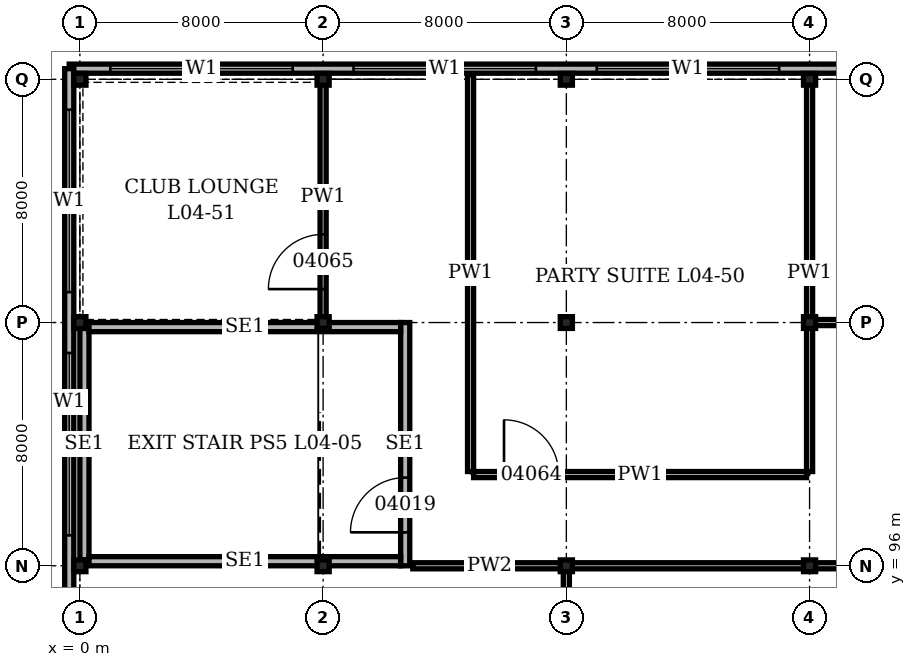
"""IFC4 building model, lengths in metres.
Left out: names, types, materials, properties, quantities, classifications, styles, units other than length and angle.
Written with IfcOpenShell. Run it as: python <this file> out.ifc"""

import sys

from ifc_helpers import new_model, si_unit, direction, frame, frame_2d, origin, origin_2d, place, context, subcontext, project, spatial, rectangle, i_section, extrude, element, fill, save


model = new_model("IFC4")
c1 = context("Model", 3, precision=1e-05, world=origin(), true_north=direction((0.0, 1.0)))
c2 = subcontext(c1, "Body", "Model", "MODEL_VIEW")
j1 = project(units=[si_unit("LENGTHUNIT", "METRE"), si_unit("PLANEANGLEUNIT", "RADIAN")], contexts=[c1])
p1 = place(None, origin())
s1 = spatial("IfcSite", under=j1, at=p1, CompositionType="ELEMENT")
p2 = place(p1, origin())
s2 = spatial("IfcBuilding", under=s1, at=p2, CompositionType="ELEMENT")
p3 = place(p2, frame((0.0, 0.0, 19.9)))
s3 = spatial("IfcBuildingStorey", under=s2, at=p3, CompositionType="ELEMENT", Elevation=19.9)
for number, where, z_axis, x_axis in (
    (1, (0.0, 96.0, 0.0), (0.0, 0.0, 1.0), (1.0, 0.0, 0.0)),
    (2, (0.0, 104.0, 0.0), (0.0, 0.0, 1.0), (1.0, 0.0, 0.0)),
    (3, (0.0, 112.0, 0.0), (0.0, 0.0, 1.0), (1.0, 0.0, 0.0)),
    (4, (8.0, 96.0, 0.0), (0.0, 0.0, 1.0), (1.0, 0.0, 0.0)),
    (5, (8.0, 104.0, 0.0), (0.0, 0.0, 1.0), (1.0, 0.0, 0.0)),
    (6, (8.0, 112.0, 0.0), (0.0, 0.0, 1.0), (1.0, 0.0, 0.0)),
    (7, (16.0, 96.0, 0.0), (0.0, 0.0, 1.0), (1.0, 0.0, 0.0)),
    (8, (16.0, 104.0, 0.0), (0.0, 0.0, 1.0), (1.0, 0.0, 0.0)),
    (9, (16.0, 112.0, 0.0), (0.0, 0.0, 1.0), (1.0, 0.0, 0.0)),
    (10, (24.0, 96.0, 0.0), (0.0, 0.0, 1.0), (1.0, 0.0, 0.0)),
    (11, (24.0, 104.0, 0.0), (0.0, 0.0, 1.0), (1.0, 0.0, 0.0)),
    (12, (24.0, 112.0, 0.0), (0.0, 0.0, 1.0), (1.0, 0.0, 0.0)),
):
    element("IfcColumn", number, at=place(p3, frame(where, z_axis=z_axis, x_axis=x_axis)), inside=s3, PredefinedType="COLUMN", context=c2, shape_type="SweptSolid", body=[
        extrude(i_section(OverallWidth=0.399, OverallDepth=0.386, WebThickness=0.021, FlangeThickness=0.033, at=origin_2d()), origin(), (0.0, 0.0, 1.0), 6.0),
    ])
p4 = place(p3, frame((112.35, 112.35, 0.0), z_axis=(0.0, 0.0, 1.0), x_axis=(-1.0, 0.0, 0.0)))
e13 = element("IfcWall", 13, at=p4, inside=s3, PredefinedType="SOLIDWALL", context=c2, shape_type="SweptSolid", body=[
    extrude(rectangle(XDim=112.7, YDim=0.3, at=frame_2d((56.35, 0.0))), origin(), (0.0, 0.0, 1.0), 6.0),
])
p5 = place(p4, frame((1.35, 0.0, 1.0)))
e14 = element("IfcOpeningElement", 14, at=p5, cuts=e13, PredefinedType="OPENING", context=c2, shape_type="SweptSolid", body=[
    extrude(rectangle(XDim=6.0, YDim=1.5, at=frame_2d((3.0, 0.75))), frame((0.0, 0.16, 0.0), z_axis=(0.0, -1.0, 0.0), x_axis=(1.0, 0.0, 0.0)), (0.0, 0.0, 1.0), 0.32),
])
p6 = place(p4, frame((9.35, 0.0, 1.0)))
e15 = element("IfcOpeningElement", 15, at=p6, cuts=e13, PredefinedType="OPENING", context=c2, shape_type="SweptSolid", body=[
    extrude(rectangle(XDim=6.0, YDim=1.5, at=frame_2d((3.0, 0.75))), frame((0.0, 0.16, 0.0), z_axis=(0.0, -1.0, 0.0), x_axis=(1.0, 0.0, 0.0)), (0.0, 0.0, 1.0), 0.32),
])
p7 = place(p4, frame((17.35, 0.0, 1.0)))
e16 = element("IfcOpeningElement", 16, at=p7, cuts=e13, PredefinedType="OPENING", context=c2, shape_type="SweptSolid", body=[
    extrude(rectangle(XDim=6.0, YDim=1.5, at=frame_2d((3.0, 0.75))), frame((0.0, 0.16, 0.0), z_axis=(0.0, -1.0, 0.0), x_axis=(1.0, 0.0, 0.0)), (0.0, 0.0, 1.0), 0.32),
])
p8 = place(p4, frame((25.35, 0.0, 1.0)))
e17 = element("IfcOpeningElement", 17, at=p8, cuts=e13, PredefinedType="OPENING", context=c2, shape_type="SweptSolid", body=[
    extrude(rectangle(XDim=6.0, YDim=1.5, at=frame_2d((3.0, 0.75))), frame((0.0, 0.16, 0.0), z_axis=(0.0, -1.0, 0.0), x_axis=(1.0, 0.0, 0.0)), (0.0, 0.0, 1.0), 0.32),
])
p9 = place(p4, frame((33.35, 0.0, 1.0)))
e18 = element("IfcOpeningElement", 18, at=p9, cuts=e13, PredefinedType="OPENING", context=c2, shape_type="SweptSolid", body=[
    extrude(rectangle(XDim=6.0, YDim=1.5, at=frame_2d((3.0, 0.75))), frame((0.0, 0.16, 0.0), z_axis=(0.0, -1.0, 0.0), x_axis=(1.0, 0.0, 0.0)), (0.0, 0.0, 1.0), 0.32),
])
p10 = place(p4, frame((41.35, 0.0, 1.0)))
e19 = element("IfcOpeningElement", 19, at=p10, cuts=e13, PredefinedType="OPENING", context=c2, shape_type="SweptSolid", body=[
    extrude(rectangle(XDim=6.0, YDim=1.5, at=frame_2d((3.0, 0.75))), frame((0.0, 0.16, 0.0), z_axis=(0.0, -1.0, 0.0), x_axis=(1.0, 0.0, 0.0)), (0.0, 0.0, 1.0), 0.32),
])
p11 = place(p4, frame((49.35, 0.0, 1.0)))
e20 = element("IfcOpeningElement", 20, at=p11, cuts=e13, PredefinedType="OPENING", context=c2, shape_type="SweptSolid", body=[
    extrude(rectangle(XDim=6.0, YDim=1.5, at=frame_2d((3.0, 0.75))), frame((0.0, 0.16, 0.0), z_axis=(0.0, -1.0, 0.0), x_axis=(1.0, 0.0, 0.0)), (0.0, 0.0, 1.0), 0.32),
])
p12 = place(p4, frame((57.35, 0.0, 1.0)))
e21 = element("IfcOpeningElement", 21, at=p12, cuts=e13, PredefinedType="OPENING", context=c2, shape_type="SweptSolid", body=[
    extrude(rectangle(XDim=6.0, YDim=1.5, at=frame_2d((3.0, 0.75))), frame((0.0, 0.16, 0.0), z_axis=(0.0, -1.0, 0.0), x_axis=(1.0, 0.0, 0.0)), (0.0, 0.0, 1.0), 0.32),
])
p13 = place(p4, frame((65.35, 0.0, 1.0)))
e22 = element("IfcOpeningElement", 22, at=p13, cuts=e13, PredefinedType="OPENING", context=c2, shape_type="SweptSolid", body=[
    extrude(rectangle(XDim=6.0, YDim=1.5, at=frame_2d((3.0, 0.75))), frame((0.0, 0.16, 0.0), z_axis=(0.0, -1.0, 0.0), x_axis=(1.0, 0.0, 0.0)), (0.0, 0.0, 1.0), 0.32),
])
p14 = place(p4, frame((73.35, 0.0, 1.0)))
e23 = element("IfcOpeningElement", 23, at=p14, cuts=e13, PredefinedType="OPENING", context=c2, shape_type="SweptSolid", body=[
    extrude(rectangle(XDim=6.0, YDim=1.5, at=frame_2d((3.0, 0.75))), frame((0.0, 0.16, 0.0), z_axis=(0.0, -1.0, 0.0), x_axis=(1.0, 0.0, 0.0)), (0.0, 0.0, 1.0), 0.32),
])
p15 = place(p4, frame((81.35, 0.0, 1.0)))
e24 = element("IfcOpeningElement", 24, at=p15, cuts=e13, PredefinedType="OPENING", context=c2, shape_type="SweptSolid", body=[
    extrude(rectangle(XDim=6.0, YDim=1.5, at=frame_2d((3.0, 0.75))), frame((0.0, 0.16, 0.0), z_axis=(0.0, -1.0, 0.0), x_axis=(1.0, 0.0, 0.0)), (0.0, 0.0, 1.0), 0.32),
])
p16 = place(p4, frame((89.35, 0.0, 1.0)))
e25 = element("IfcOpeningElement", 25, at=p16, cuts=e13, PredefinedType="OPENING", context=c2, shape_type="SweptSolid", body=[
    extrude(rectangle(XDim=6.0, YDim=1.5, at=frame_2d((3.0, 0.75))), frame((0.0, 0.16, 0.0), z_axis=(0.0, -1.0, 0.0), x_axis=(1.0, 0.0, 0.0)), (0.0, 0.0, 1.0), 0.32),
])
p17 = place(p4, frame((97.35, 0.0, 1.0)))
e26 = element("IfcOpeningElement", 26, at=p17, cuts=e13, PredefinedType="OPENING", context=c2, shape_type="SweptSolid", body=[
    extrude(rectangle(XDim=6.0, YDim=1.5, at=frame_2d((3.0, 0.75))), frame((0.0, 0.16, 0.0), z_axis=(0.0, -1.0, 0.0), x_axis=(1.0, 0.0, 0.0)), (0.0, 0.0, 1.0), 0.32),
])
p18 = place(p4, frame((105.35, 0.0, 1.0)))
e27 = element("IfcOpeningElement", 27, at=p18, cuts=e13, PredefinedType="OPENING", context=c2, shape_type="SweptSolid", body=[
    extrude(rectangle(XDim=6.0, YDim=1.5, at=frame_2d((3.0, 0.75))), frame((0.0, 0.16, 0.0), z_axis=(0.0, -1.0, 0.0), x_axis=(1.0, 0.0, 0.0)), (0.0, 0.0, 1.0), 0.32),
])
p19 = place(p3, frame((-0.35, 112.35, 0.0), z_axis=(0.0, 0.0, 1.0), x_axis=(0.0, -1.0, 0.0)))
e28 = element("IfcWall", 28, at=p19, inside=s3, PredefinedType="SOLIDWALL", context=c2, shape_type="SweptSolid", body=[
    extrude(rectangle(XDim=112.7, YDim=0.3, at=frame_2d((56.35, 0.0))), origin(), (0.0, 0.0, 1.0), 6.0),
])
p20 = place(p19, frame((1.35, 0.0, 1.0)))
e29 = element("IfcOpeningElement", 29, at=p20, cuts=e28, PredefinedType="OPENING", context=c2, shape_type="SweptSolid", body=[
    extrude(rectangle(XDim=6.0, YDim=1.5, at=frame_2d((3.0, 0.75))), frame((0.0, 0.16, 0.0), z_axis=(0.0, -1.0, 0.0), x_axis=(1.0, 0.0, 0.0)), (0.0, 0.0, 1.0), 0.32),
])
p21 = place(p19, frame((9.35, 0.0, 1.0)))
e30 = element("IfcOpeningElement", 30, at=p21, cuts=e28, PredefinedType="OPENING", context=c2, shape_type="SweptSolid", body=[
    extrude(rectangle(XDim=6.0, YDim=1.5, at=frame_2d((3.0, 0.75))), frame((0.0, 0.16, 0.0), z_axis=(0.0, -1.0, 0.0), x_axis=(1.0, 0.0, 0.0)), (0.0, 0.0, 1.0), 0.32),
])
p22 = place(p19, frame((17.35, 0.0, 1.0)))
e31 = element("IfcOpeningElement", 31, at=p22, cuts=e28, PredefinedType="OPENING", context=c2, shape_type="SweptSolid", body=[
    extrude(rectangle(XDim=6.0, YDim=1.5, at=frame_2d((3.0, 0.75))), frame((0.0, 0.16, 0.0), z_axis=(0.0, -1.0, 0.0), x_axis=(1.0, 0.0, 0.0)), (0.0, 0.0, 1.0), 0.32),
])
p23 = place(p19, frame((25.35, 0.0, 1.0)))
e32 = element("IfcOpeningElement", 32, at=p23, cuts=e28, PredefinedType="OPENING", context=c2, shape_type="SweptSolid", body=[
    extrude(rectangle(XDim=6.0, YDim=1.5, at=frame_2d((3.0, 0.75))), frame((0.0, 0.16, 0.0), z_axis=(0.0, -1.0, 0.0), x_axis=(1.0, 0.0, 0.0)), (0.0, 0.0, 1.0), 0.32),
])
p24 = place(p19, frame((33.35, 0.0, 1.0)))
e33 = element("IfcOpeningElement", 33, at=p24, cuts=e28, PredefinedType="OPENING", context=c2, shape_type="SweptSolid", body=[
    extrude(rectangle(XDim=6.0, YDim=1.5, at=frame_2d((3.0, 0.75))), frame((0.0, 0.16, 0.0), z_axis=(0.0, -1.0, 0.0), x_axis=(1.0, 0.0, 0.0)), (0.0, 0.0, 1.0), 0.32),
])
p25 = place(p19, frame((41.35, 0.0, 1.0)))
e34 = element("IfcOpeningElement", 34, at=p25, cuts=e28, PredefinedType="OPENING", context=c2, shape_type="SweptSolid", body=[
    extrude(rectangle(XDim=6.0, YDim=1.5, at=frame_2d((3.0, 0.75))), frame((0.0, 0.16, 0.0), z_axis=(0.0, -1.0, 0.0), x_axis=(1.0, 0.0, 0.0)), (0.0, 0.0, 1.0), 0.32),
])
p26 = place(p19, frame((49.35, 0.0, 1.0)))
e35 = element("IfcOpeningElement", 35, at=p26, cuts=e28, PredefinedType="OPENING", context=c2, shape_type="SweptSolid", body=[
    extrude(rectangle(XDim=6.0, YDim=1.5, at=frame_2d((3.0, 0.75))), frame((0.0, 0.16, 0.0), z_axis=(0.0, -1.0, 0.0), x_axis=(1.0, 0.0, 0.0)), (0.0, 0.0, 1.0), 0.32),
])
p27 = place(p19, frame((57.35, 0.0, 1.0)))
e36 = element("IfcOpeningElement", 36, at=p27, cuts=e28, PredefinedType="OPENING", context=c2, shape_type="SweptSolid", body=[
    extrude(rectangle(XDim=6.0, YDim=1.5, at=frame_2d((3.0, 0.75))), frame((0.0, 0.16, 0.0), z_axis=(0.0, -1.0, 0.0), x_axis=(1.0, 0.0, 0.0)), (0.0, 0.0, 1.0), 0.32),
])
p28 = place(p19, frame((65.35, 0.0, 1.0)))
e37 = element("IfcOpeningElement", 37, at=p28, cuts=e28, PredefinedType="OPENING", context=c2, shape_type="SweptSolid", body=[
    extrude(rectangle(XDim=6.0, YDim=1.5, at=frame_2d((3.0, 0.75))), frame((0.0, 0.16, 0.0), z_axis=(0.0, -1.0, 0.0), x_axis=(1.0, 0.0, 0.0)), (0.0, 0.0, 1.0), 0.32),
])
p29 = place(p19, frame((73.35, 0.0, 1.0)))
e38 = element("IfcOpeningElement", 38, at=p29, cuts=e28, PredefinedType="OPENING", context=c2, shape_type="SweptSolid", body=[
    extrude(rectangle(XDim=6.0, YDim=1.5, at=frame_2d((3.0, 0.75))), frame((0.0, 0.16, 0.0), z_axis=(0.0, -1.0, 0.0), x_axis=(1.0, 0.0, 0.0)), (0.0, 0.0, 1.0), 0.32),
])
p30 = place(p19, frame((81.35, 0.0, 1.0)))
e39 = element("IfcOpeningElement", 39, at=p30, cuts=e28, PredefinedType="OPENING", context=c2, shape_type="SweptSolid", body=[
    extrude(rectangle(XDim=6.0, YDim=1.5, at=frame_2d((3.0, 0.75))), frame((0.0, 0.16, 0.0), z_axis=(0.0, -1.0, 0.0), x_axis=(1.0, 0.0, 0.0)), (0.0, 0.0, 1.0), 0.32),
])
p31 = place(p19, frame((89.35, 0.0, 1.0)))
e40 = element("IfcOpeningElement", 40, at=p31, cuts=e28, PredefinedType="OPENING", context=c2, shape_type="SweptSolid", body=[
    extrude(rectangle(XDim=6.0, YDim=1.5, at=frame_2d((3.0, 0.75))), frame((0.0, 0.16, 0.0), z_axis=(0.0, -1.0, 0.0), x_axis=(1.0, 0.0, 0.0)), (0.0, 0.0, 1.0), 0.32),
])
p32 = place(p19, frame((97.35, 0.0, 1.0)))
e41 = element("IfcOpeningElement", 41, at=p32, cuts=e28, PredefinedType="OPENING", context=c2, shape_type="SweptSolid", body=[
    extrude(rectangle(XDim=6.0, YDim=1.5, at=frame_2d((3.0, 0.75))), frame((0.0, 0.16, 0.0), z_axis=(0.0, -1.0, 0.0), x_axis=(1.0, 0.0, 0.0)), (0.0, 0.0, 1.0), 0.32),
])
p33 = place(p19, frame((105.35, 0.0, 1.0)))
e42 = element("IfcOpeningElement", 42, at=p33, cuts=e28, PredefinedType="OPENING", context=c2, shape_type="SweptSolid", body=[
    extrude(rectangle(XDim=6.0, YDim=1.5, at=frame_2d((3.0, 0.75))), frame((0.0, 0.16, 0.0), z_axis=(0.0, -1.0, 0.0), x_axis=(1.0, 0.0, 0.0)), (0.0, 0.0, 1.0), 0.32),
])
p34 = place(p3, frame((0.15, 96.193, 0.0), z_axis=(0.0, 0.0, 1.0), x_axis=(0.0, 1.0, 0.0)))
e43 = element("IfcWall", 43, at=p34, inside=s3, PredefinedType="SOLIDWALL", context=c2, shape_type="SweptSolid", body=[
    extrude(rectangle(XDim=7.614, YDim=0.3, at=frame_2d((3.807, 0.0))), origin(), (0.0, 0.0, 1.0), 5.75),
])
p35 = place(p3, frame((10.7, 96.0, 0.0), z_axis=(0.0, 0.0, 1.0), x_axis=(0.0, 1.0, 0.0)))
e44 = element("IfcWall", 44, at=p35, inside=s3, PredefinedType="SOLIDWALL", context=c2, shape_type="SweptSolid", body=[
    extrude(rectangle(XDim=8.0, YDim=0.3, at=frame_2d((4.0, 0.0))), origin(), (0.0, 0.0, 1.0), 5.75),
])
p36 = place(p35, frame((1.1, 0.0, 0.0)))
e45 = element("IfcOpeningElement", 45, at=p36, cuts=e44, PredefinedType="OPENING", context=c2, shape_type="SweptSolid", body=[
    extrude(rectangle(XDim=1.8, YDim=2.1, at=frame_2d((0.9, 1.05))), frame((0.0, 0.16, 0.0), z_axis=(0.0, -1.0, 0.0), x_axis=(1.0, 0.0, 0.0)), (0.0, 0.0, 1.0), 0.32),
])
for number, where, z_axis, x_axis in (
    (46, (0.3, 96.15, 0.0), (0.0, 0.0, 1.0), (1.0, 0.0, 0.0)),
    (47, (0.3, 103.85, 0.0), (0.0, 0.0, 1.0), (1.0, 0.0, 0.0)),
):
    element("IfcWall", number, at=place(p3, frame(where, z_axis=z_axis, x_axis=x_axis)), inside=s3, PredefinedType="SOLIDWALL", context=c2, shape_type="SweptSolid", body=[
        extrude(rectangle(XDim=10.25, YDim=0.3, at=frame_2d((5.125, 0.0))), origin(), (0.0, 0.0, 1.0), 5.75),
    ])
p37 = place(p3, frame((10.95, 96.0, 0.0), z_axis=(0.0, 0.0, 1.0), x_axis=(1.0, 0.0, 0.0)))
e48 = element("IfcWall", 48, at=p37, inside=s3, PredefinedType="PARTITIONING", context=c2, shape_type="SweptSolid", body=[
    extrude(rectangle(XDim=5.05, YDim=0.2, at=frame_2d((2.525, 0.0))), origin(), (0.0, 0.0, 1.0), 4.978),
])
p38 = place(p3, frame((16.0, 96.0, 0.0), z_axis=(0.0, 0.0, 1.0), x_axis=(1.0, 0.0, 0.0)))
e49 = element("IfcWall", 49, at=p38, inside=s3, PredefinedType="PARTITIONING", context=c2, shape_type="SweptSolid", body=[
    extrude(rectangle(XDim=23.9, YDim=0.2, at=frame_2d((11.95, 0.0))), origin(), (0.0, 0.0, 1.0), 4.978),
])
p39 = place(p3, frame((12.95, 99.0, 0.0), z_axis=(0.0, 0.0, 1.0), x_axis=(1.0, 0.0, 0.0)))
e50 = element("IfcWall", 50, at=p39, inside=s3, PredefinedType="PARTITIONING", context=c2, shape_type="SweptSolid", body=[
    extrude(rectangle(XDim=10.95, YDim=0.2, at=frame_2d((5.475, 0.0))), origin(), (0.0, 0.0, 1.0), 5.75),
])
p40 = place(p39, frame((1.0, 0.0, 0.0)))
e51 = element("IfcOpeningElement", 51, at=p40, cuts=e50, PredefinedType="OPENING", context=c2, shape_type="SweptSolid", body=[
    extrude(rectangle(XDim=1.8, YDim=2.4, at=frame_2d((0.9, 1.2))), frame((0.0, 0.11, 0.0), z_axis=(0.0, -1.0, 0.0), x_axis=(1.0, 0.0, 0.0)), (0.0, 0.0, 1.0), 0.22),
])
p41 = place(p3, frame((24.1, 104.0, 0.0), z_axis=(0.0, 0.0, 1.0), x_axis=(1.0, 0.0, 0.0)))
e52 = element("IfcWall", 52, at=p41, inside=s3, PredefinedType="PARTITIONING", context=c2, shape_type="SweptSolid", body=[
    extrude(rectangle(XDim=71.9, YDim=0.2, at=frame_2d((35.95, 0.0))), origin(), (0.0, 0.0, 1.0), 4.978),
])
p42 = place(p41, frame((1.0, 0.0, 0.0)))
e53 = element("IfcOpeningElement", 53, at=p42, cuts=e52, PredefinedType="OPENING", context=c2, shape_type="SweptSolid", body=[
    extrude(rectangle(XDim=1.8, YDim=2.4, at=frame_2d((0.9, 1.2))), frame((0.0, 0.11, 0.0), z_axis=(0.0, -1.0, 0.0), x_axis=(1.0, 0.0, 0.0)), (0.0, 0.0, 1.0), 0.22),
])
p43 = place(p41, frame((26.0, 0.0, 0.0)))
e54 = element("IfcOpeningElement", 54, at=p43, cuts=e52, PredefinedType="OPENING", context=c2, shape_type="SweptSolid", body=[
    extrude(rectangle(XDim=1.8, YDim=2.4, at=frame_2d((0.9, 1.2))), frame((0.0, 0.11, 0.0), z_axis=(0.0, -1.0, 0.0), x_axis=(1.0, 0.0, 0.0)), (0.0, 0.0, 1.0), 0.22),
])
p44 = place(p41, frame((34.0, 0.0, 0.0)))
e55 = element("IfcOpeningElement", 55, at=p44, cuts=e52, PredefinedType="OPENING", context=c2, shape_type="SweptSolid", body=[
    extrude(rectangle(XDim=1.8, YDim=2.4, at=frame_2d((0.9, 1.2))), frame((0.0, 0.11, 0.0), z_axis=(0.0, -1.0, 0.0), x_axis=(1.0, 0.0, 0.0)), (0.0, 0.0, 1.0), 0.22),
])
p45 = place(p41, frame((44.65, 0.0, 0.0)))
e56 = element("IfcOpeningElement", 56, at=p45, cuts=e52, PredefinedType="OPENING", context=c2, shape_type="SweptSolid", body=[
    extrude(rectangle(XDim=1.0, YDim=2.1, at=frame_2d((0.5, 1.05))), frame((0.0, 0.11, 0.0), z_axis=(0.0, -1.0, 0.0), x_axis=(1.0, 0.0, 0.0)), (0.0, 0.0, 1.0), 0.22),
])
p46 = place(p3, frame((8.0, 104.1, 0.0), z_axis=(0.0, 0.0, 1.0), x_axis=(0.0, 1.0, 0.0)))
e57 = element("IfcWall", 57, at=p46, inside=s3, PredefinedType="PARTITIONING", context=c2, shape_type="SweptSolid", body=[
    extrude(rectangle(XDim=8.05, YDim=0.2, at=frame_2d((4.025, 0.0))), origin(), (0.0, 0.0, 1.0), 4.978),
])
p47 = place(p46, frame((1.0, 0.0, 0.0)))
e58 = element("IfcOpeningElement", 58, at=p47, cuts=e57, PredefinedType="OPENING", context=c2, shape_type="SweptSolid", body=[
    extrude(rectangle(XDim=1.8, YDim=2.4, at=frame_2d((0.9, 1.2))), frame((0.0, 0.11, 0.0), z_axis=(0.0, -1.0, 0.0), x_axis=(1.0, 0.0, 0.0)), (0.0, 0.0, 1.0), 0.22),
])
p48 = place(p3, frame((12.85, 99.1, 0.0), z_axis=(0.0, 0.0, 1.0), x_axis=(0.0, 1.0, 0.0)))
e59 = element("IfcWall", 59, at=p48, inside=s3, PredefinedType="PARTITIONING", context=c2, shape_type="SweptSolid", body=[
    extrude(rectangle(XDim=13.05, YDim=0.2, at=frame_2d((6.525, 0.0))), origin(), (0.0, 0.0, 1.0), 5.75),
])
p49 = place(p3, frame((16.0, 72.1, 0.0), z_axis=(0.0, 0.0, 1.0), x_axis=(0.0, 1.0, 0.0)))
e60 = element("IfcWall", 60, at=p49, inside=s3, PredefinedType="PARTITIONING", context=c2, shape_type="SweptSolid", body=[
    extrude(rectangle(XDim=23.8, YDim=0.2, at=frame_2d((11.9, 0.0))), origin(), (0.0, 0.0, 1.0), 4.978),
])
p50 = place(p3, frame((24.0, 99.1, 0.0), z_axis=(0.0, 0.0, 1.0), x_axis=(0.0, 1.0, 0.0)))
e61 = element("IfcWall", 61, at=p50, inside=s3, PredefinedType="PARTITIONING", context=c2, shape_type="SweptSolid", body=[
    extrude(rectangle(XDim=13.05, YDim=0.2, at=frame_2d((6.525, 0.0))), origin(), (0.0, 0.0, 1.0), 4.978),
])
p51 = place(p16, origin())
e62 = element("IfcWindow", 62, at=p51, inside=s3, PartitioningType="SINGLE_PANEL", PredefinedType="WINDOW", context=c2, shape_type="SweptSolid", body=[
    extrude(rectangle(XDim=6.0, YDim=1.5, at=frame_2d((3.0, 0.75))), frame((0.0, 0.03, 0.0), z_axis=(0.0, -1.0, 0.0), x_axis=(1.0, 0.0, 0.0)), (0.0, 0.0, 1.0), 0.06),
])
fill(e25, e62)
p52 = place(p17, origin())
e63 = element("IfcWindow", 63, at=p52, inside=s3, PartitioningType="SINGLE_PANEL", PredefinedType="WINDOW", context=c2, shape_type="SweptSolid", body=[
    extrude(rectangle(XDim=6.0, YDim=1.5, at=frame_2d((3.0, 0.75))), frame((0.0, 0.03, 0.0), z_axis=(0.0, -1.0, 0.0), x_axis=(1.0, 0.0, 0.0)), (0.0, 0.0, 1.0), 0.06),
])
fill(e26, e63)
p53 = place(p18, origin())
e64 = element("IfcWindow", 64, at=p53, inside=s3, PartitioningType="SINGLE_PANEL", PredefinedType="WINDOW", context=c2, shape_type="SweptSolid", body=[
    extrude(rectangle(XDim=6.0, YDim=1.5, at=frame_2d((3.0, 0.75))), frame((0.0, 0.03, 0.0), z_axis=(0.0, -1.0, 0.0), x_axis=(1.0, 0.0, 0.0)), (0.0, 0.0, 1.0), 0.06),
])
fill(e27, e64)
p54 = place(p20, origin())
e65 = element("IfcWindow", 65, at=p54, inside=s3, PartitioningType="SINGLE_PANEL", PredefinedType="WINDOW", context=c2, shape_type="SweptSolid", body=[
    extrude(rectangle(XDim=6.0, YDim=1.5, at=frame_2d((3.0, 0.75))), frame((0.0, 0.03, 0.0), z_axis=(0.0, -1.0, 0.0), x_axis=(1.0, 0.0, 0.0)), (0.0, 0.0, 1.0), 0.06),
])
fill(e29, e65)
p55 = place(p21, origin())
e66 = element("IfcWindow", 66, at=p55, inside=s3, PartitioningType="SINGLE_PANEL", PredefinedType="WINDOW", context=c2, shape_type="SweptSolid", body=[
    extrude(rectangle(XDim=6.0, YDim=1.5, at=frame_2d((3.0, 0.75))), frame((0.0, 0.03, 0.0), z_axis=(0.0, -1.0, 0.0), x_axis=(1.0, 0.0, 0.0)), (0.0, 0.0, 1.0), 0.06),
])
fill(e30, e66)
p56 = place(p36, origin())
e67 = element("IfcDoor", 67, at=p56, inside=s3, OperationType="DOUBLE_DOOR_SINGLE_SWING", PredefinedType="DOOR", context=c2, shape_type="SweptSolid", body=[
    extrude(rectangle(XDim=1.8, YDim=2.1, at=frame_2d((0.9, 1.05))), frame((0.0, 0.15, 0.0), z_axis=(0.0, -1.0, 0.0), x_axis=(1.0, 0.0, 0.0)), (0.0, 0.0, 1.0), 0.3),
])
fill(e45, e67)
p57 = place(p40, origin())
e68 = element("IfcDoor", 68, at=p57, inside=s3, OperationType="DOUBLE_DOOR_DOUBLE_SWING", PredefinedType="DOOR", context=c2, shape_type="SweptSolid", body=[
    extrude(rectangle(XDim=1.8, YDim=2.4, at=frame_2d((0.9, 1.2))), frame((0.0, 0.1, 0.0), z_axis=(0.0, -1.0, 0.0), x_axis=(1.0, 0.0, 0.0)), (0.0, 0.0, 1.0), 0.199),
])
fill(e51, e68)
p58 = place(p47, origin())
e69 = element("IfcDoor", 69, at=p58, inside=s3, OperationType="DOUBLE_DOOR_DOUBLE_SWING", PredefinedType="DOOR", context=c2, shape_type="SweptSolid", body=[
    extrude(rectangle(XDim=1.8, YDim=2.4, at=frame_2d((0.9, 1.2))), frame((0.0, 0.1, 0.0), z_axis=(0.0, -1.0, 0.0), x_axis=(1.0, 0.0, 0.0)), (0.0, 0.0, 1.0), 0.199),
])
fill(e58, e69)
save(model, sys.argv[1])
